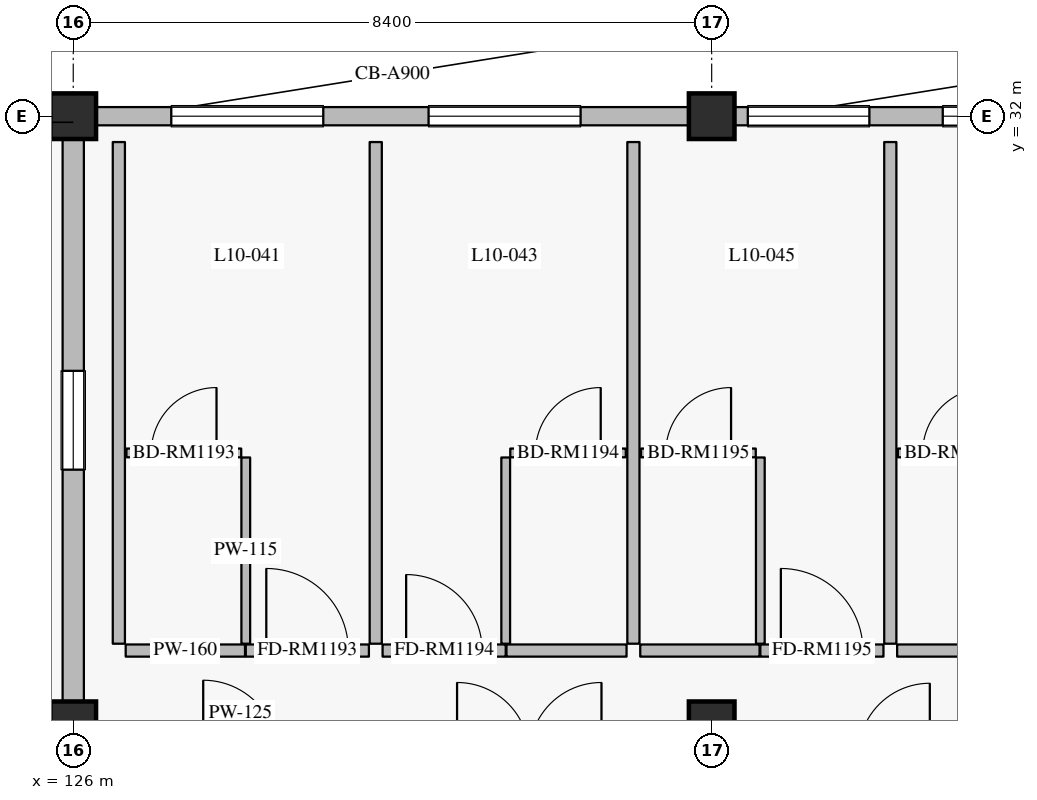
"""IFC4 building model, lengths in metres.
Left out: names, types, materials, properties, quantities, classifications, styles, units other than length and angle.
Written with IfcOpenShell. Run it as: python <this file> out.ifc"""

import sys

from ifc_helpers import new_model, si_unit, direction, frame, frame_2d, origin, origin_2d, place, context, subcontext, project, spatial, rectangle, extrude, element, fill, save


model = new_model("IFC4")
c1 = context("Model", 3, precision=1e-05, world=origin(), true_north=direction((0.0, 1.0)))
c2 = subcontext(c1, "Body", "Model", "MODEL_VIEW")
j1 = project(units=[si_unit("LENGTHUNIT", "METRE"), si_unit("PLANEANGLEUNIT", "RADIAN")], contexts=[c1])
p1 = place(None, origin())
s1 = spatial("IfcSite", under=j1, at=p1, CompositionType="ELEMENT")
p2 = place(p1, origin())
s2 = spatial("IfcBuilding", under=s1, at=p2, CompositionType="ELEMENT")
p3 = place(p2, frame((0.0, 0.0, 43.2)))
s3 = spatial("IfcBuildingStorey", under=s2, at=p3, CompositionType="ELEMENT", Elevation=43.2)
for number, where, z_axis, x_axis in (
    (1, (126.0, 32.0, 0.0), (0.0, 0.0, 1.0), (1.0, 0.0, 0.0)),
    (2, (134.4, 32.0, 0.0), (0.0, 0.0, 1.0), (1.0, 0.0, 0.0)),
    (3, (126.0, 24.0, 0.0), (0.0, 0.0, 1.0), (1.0, 0.0, 0.0)),
    (4, (134.4, 24.0, 0.0), (0.0, 0.0, 1.0), (1.0, 0.0, 0.0)),
):
    element("IfcColumn", number, at=place(p3, frame(where, z_axis=z_axis, x_axis=x_axis)), inside=s3, PredefinedType="COLUMN", context=c2, shape_type="SweptSolid", body=[
        extrude(rectangle(XDim=0.6, YDim=0.6, at=origin_2d()), origin(), (0.0, 0.0, 1.0), 4.2),
    ])
p4 = place(p3, frame((126.3, 32.0, 0.0), z_axis=(0.0, 0.0, 1.0), x_axis=(1.0, 0.0, 0.0)))
e5 = element("IfcWall", 5, at=p4, inside=s3, PredefinedType="SOLIDWALL", context=c2, shape_type="SweptSolid", body=[
    extrude(rectangle(XDim=7.8, YDim=0.24, at=frame_2d((3.9, 0.0))), origin(), (0.0, 0.0, 1.0), 3.54),
])
p5 = place(p4, frame((0.99, 0.0, 0.8)))
e6 = element("IfcOpeningElement", 6, at=p5, cuts=e5, PredefinedType="OPENING", context=c2, shape_type="SweptSolid", body=[
    extrude(rectangle(XDim=2.0, YDim=1.75, at=frame_2d((1.0, 0.875))), frame((0.0, 0.13, 0.0), z_axis=(0.0, -1.0, 0.0), x_axis=(1.0, 0.0, 0.0)), (0.0, 0.0, 1.0), 0.26),
])
p6 = place(p4, frame((4.375, 0.0, 0.8)))
e7 = element("IfcOpeningElement", 7, at=p6, cuts=e5, PredefinedType="OPENING", context=c2, shape_type="SweptSolid", body=[
    extrude(rectangle(XDim=2.0, YDim=1.75, at=frame_2d((1.0, 0.875))), frame((0.0, 0.13, 0.0), z_axis=(0.0, -1.0, 0.0), x_axis=(1.0, 0.0, 0.0)), (0.0, 0.0, 1.0), 0.26),
])
p7 = place(p3, frame((134.7, 32.0, 0.0), z_axis=(0.0, 0.0, 1.0), x_axis=(1.0, 0.0, 0.0)))
e8 = element("IfcWall", 8, at=p7, inside=s3, PredefinedType="SOLIDWALL", context=c2, shape_type="SweptSolid", body=[
    extrude(rectangle(XDim=7.8, YDim=0.24, at=frame_2d((3.9, 0.0))), origin(), (0.0, 0.0, 1.0), 3.54),
])
p8 = place(p7, frame((0.175, 0.0, 0.8)))
e9 = element("IfcOpeningElement", 9, at=p8, cuts=e8, PredefinedType="OPENING", context=c2, shape_type="SweptSolid", body=[
    extrude(rectangle(XDim=1.6, YDim=1.6, at=frame_2d((0.8, 0.8))), frame((0.0, 0.13, 0.0), z_axis=(0.0, -1.0, 0.0), x_axis=(1.0, 0.0, 0.0)), (0.0, 0.0, 1.0), 0.26),
])
p9 = place(p7, frame((2.74, 0.0, 0.8)))
e10 = element("IfcOpeningElement", 10, at=p9, cuts=e8, PredefinedType="OPENING", context=c2, shape_type="SweptSolid", body=[
    extrude(rectangle(XDim=2.0, YDim=1.75, at=frame_2d((1.0, 0.875))), frame((0.0, 0.13, 0.0), z_axis=(0.0, -1.0, 0.0), x_axis=(1.0, 0.0, 0.0)), (0.0, 0.0, 1.0), 0.26),
])
p10 = place(p7, frame((5.665, 0.0, 0.8)))
e11 = element("IfcOpeningElement", 11, at=p10, cuts=e8, PredefinedType="OPENING", context=c2, shape_type="SweptSolid", body=[
    extrude(rectangle(XDim=2.0, YDim=1.75, at=frame_2d((1.0, 0.875))), frame((0.0, 0.13, 0.0), z_axis=(0.0, -1.0, 0.0), x_axis=(1.0, 0.0, 0.0)), (0.0, 0.0, 1.0), 0.26),
])
p11 = place(p3, frame((126.0, 24.3, 0.0), z_axis=(0.0, 0.0, 1.0), x_axis=(0.0, 1.0, 0.0)))
e12 = element("IfcWall", 12, at=p11, inside=s3, PredefinedType="SOLIDWALL", context=c2, shape_type="SweptSolid", body=[
    extrude(rectangle(XDim=7.4, YDim=0.28, at=frame_2d((3.7, 0.0))), origin(), (0.0, 0.0, 1.0), 3.3),
])
p12 = place(p11, frame((3.05, 0.0, 0.75)))
e13 = element("IfcOpeningElement", 13, at=p12, cuts=e12, PredefinedType="OPENING", context=c2, shape_type="SweptSolid", body=[
    extrude(rectangle(XDim=1.3, YDim=1.65, at=frame_2d((0.65, 0.825))), frame((0.0, 0.15, 0.0), z_axis=(0.0, -1.0, 0.0), x_axis=(1.0, 0.0, 0.0)), (0.0, 0.0, 1.0), 0.3),
])
p13 = place(p3, frame((126.69, 24.97, 0.0), z_axis=(0.0, 0.0, 1.0), x_axis=(1.0, 0.0, 0.0)))
e14 = element("IfcWall", 14, at=p13, inside=s3, PredefinedType="PARTITIONING", context=c2, shape_type="SweptSolid", body=[
    extrude(rectangle(XDim=1.57, YDim=0.16, at=frame_2d((0.785, 0.0))), origin(), (0.0, 0.0, 1.0), 3.935),
])
p14 = place(p3, frame((128.27, 24.97, 0.0), z_axis=(0.0, 0.0, 1.0), x_axis=(1.0, 0.0, 0.0)))
e15 = element("IfcWall", 15, at=p14, inside=s3, PredefinedType="PARTITIONING", context=c2, shape_type="SweptSolid", body=[
    extrude(rectangle(XDim=1.62, YDim=0.16, at=frame_2d((0.81, 0.0))), origin(), (0.0, 0.0, 1.0), 3.935),
])
p15 = place(p14, frame((0.27, 0.0, 0.0)))
e16 = element("IfcOpeningElement", 16, at=p15, cuts=e15, PredefinedType="OPENING", context=c2, shape_type="SweptSolid", body=[
    extrude(rectangle(XDim=1.08, YDim=2.3, at=frame_2d((0.54, 1.15))), frame((0.0, 0.09, 0.0), z_axis=(0.0, -1.0, 0.0), x_axis=(1.0, 0.0, 0.0)), (0.0, 0.0, 1.0), 0.18),
])
p16 = place(p3, frame((128.27, 25.06, 0.0), z_axis=(0.0, 0.0, 1.0), x_axis=(0.0, 1.0, 0.0)))
e17 = element("IfcWall", 17, at=p16, inside=s3, PredefinedType="PARTITIONING", context=c2, shape_type="SweptSolid", body=[
    extrude(rectangle(XDim=2.45, YDim=0.115, at=frame_2d((1.225, 0.0))), origin(), (0.0, 0.0, 1.0), 3.935),
])
p17 = place(p3, frame((126.7, 27.57, 0.0), z_axis=(0.0, 0.0, 1.0), x_axis=(1.0, 0.0, 0.0)))
e18 = element("IfcWall", 18, at=p17, inside=s3, PredefinedType="PARTITIONING", context=c2, shape_type="SweptSolid", body=[
    extrude(rectangle(XDim=1.51, YDim=0.115, at=frame_2d((0.755, 0.0))), origin(), (0.0, 0.0, 1.0), 3.935),
])
p18 = place(p17, frame((0.325, 0.0, 0.0)))
e19 = element("IfcOpeningElement", 19, at=p18, cuts=e18, PredefinedType="OPENING", context=c2, shape_type="SweptSolid", body=[
    extrude(rectangle(XDim=0.86, YDim=2.12, at=frame_2d((0.43, 1.06))), frame((0.0, 0.067, 0.0), z_axis=(0.0, -1.0, 0.0), x_axis=(1.0, 0.0, 0.0)), (0.0, 0.0, 1.0), 0.135),
])
p19 = place(p3, frame((126.6, 25.06, 0.0), z_axis=(0.0, 0.0, 1.0), x_axis=(0.0, 1.0, 0.0)))
e20 = element("IfcWall", 20, at=p19, inside=s3, PredefinedType="PARTITIONING", context=c2, shape_type="SweptSolid", body=[
    extrude(rectangle(XDim=6.6, YDim=0.16, at=frame_2d((3.3, 0.0))), origin(), (0.0, 0.0, 1.0), 3.935),
])
p20 = place(p3, frame((130.07, 24.97, 0.0), z_axis=(0.0, 0.0, 1.0), x_axis=(1.0, 0.0, 0.0)))
e21 = element("IfcWall", 21, at=p20, inside=s3, PredefinedType="PARTITIONING", context=c2, shape_type="SweptSolid", body=[
    extrude(rectangle(XDim=1.62, YDim=0.16, at=frame_2d((0.81, 0.0))), origin(), (0.0, 0.0, 1.0), 3.935),
])
p21 = place(p20, frame((0.31, 0.0, 0.0)))
e22 = element("IfcOpeningElement", 22, at=p21, cuts=e21, PredefinedType="OPENING", context=c2, shape_type="SweptSolid", body=[
    extrude(rectangle(XDim=1.0, YDim=2.25, at=frame_2d((0.5, 1.125))), frame((0.0, 0.09, 0.0), z_axis=(0.0, -1.0, 0.0), x_axis=(1.0, 0.0, 0.0)), (0.0, 0.0, 1.0), 0.18),
])
p22 = place(p3, frame((131.7, 24.97, 0.0), z_axis=(0.0, 0.0, 1.0), x_axis=(1.0, 0.0, 0.0)))
e23 = element("IfcWall", 23, at=p22, inside=s3, PredefinedType="PARTITIONING", context=c2, shape_type="SweptSolid", body=[
    extrude(rectangle(XDim=1.58, YDim=0.16, at=frame_2d((0.79, 0.0))), origin(), (0.0, 0.0, 1.0), 3.935),
])
p23 = place(p3, frame((131.69, 25.06, 0.0), z_axis=(0.0, 0.0, 1.0), x_axis=(0.0, 1.0, 0.0)))
e24 = element("IfcWall", 24, at=p23, inside=s3, PredefinedType="PARTITIONING", context=c2, shape_type="SweptSolid", body=[
    extrude(rectangle(XDim=2.45, YDim=0.115, at=frame_2d((1.225, 0.0))), origin(), (0.0, 0.0, 1.0), 3.935),
])
p24 = place(p3, frame((131.75, 27.57, 0.0), z_axis=(0.0, 0.0, 1.0), x_axis=(1.0, 0.0, 0.0)))
e25 = element("IfcWall", 25, at=p24, inside=s3, PredefinedType="PARTITIONING", context=c2, shape_type="SweptSolid", body=[
    extrude(rectangle(XDim=1.52, YDim=0.115, at=frame_2d((0.76, 0.0))), origin(), (0.0, 0.0, 1.0), 3.935),
])
p25 = place(p24, frame((0.33, 0.0, 0.0)))
e26 = element("IfcOpeningElement", 26, at=p25, cuts=e25, PredefinedType="OPENING", context=c2, shape_type="SweptSolid", body=[
    extrude(rectangle(XDim=0.86, YDim=2.12, at=frame_2d((0.43, 1.06))), frame((0.0, 0.067, 0.0), z_axis=(0.0, -1.0, 0.0), x_axis=(1.0, 0.0, 0.0)), (0.0, 0.0, 1.0), 0.135),
])
p26 = place(p3, frame((129.98, 25.06, 0.0), z_axis=(0.0, 0.0, 1.0), x_axis=(0.0, 1.0, 0.0)))
e27 = element("IfcWall", 27, at=p26, inside=s3, PredefinedType="PARTITIONING", context=c2, shape_type="SweptSolid", body=[
    extrude(rectangle(XDim=6.6, YDim=0.16, at=frame_2d((3.3, 0.0))), origin(), (0.0, 0.0, 1.0), 3.935),
])
p27 = place(p3, frame((133.46, 24.97, 0.0), z_axis=(0.0, 0.0, 1.0), x_axis=(1.0, 0.0, 0.0)))
e28 = element("IfcWall", 28, at=p27, inside=s3, PredefinedType="PARTITIONING", context=c2, shape_type="SweptSolid", body=[
    extrude(rectangle(XDim=1.57, YDim=0.16, at=frame_2d((0.785, 0.0))), origin(), (0.0, 0.0, 1.0), 3.935),
])
p28 = place(p3, frame((135.04, 24.97, 0.0), z_axis=(0.0, 0.0, 1.0), x_axis=(1.0, 0.0, 0.0)))
e29 = element("IfcWall", 29, at=p28, inside=s3, PredefinedType="PARTITIONING", context=c2, shape_type="SweptSolid", body=[
    extrude(rectangle(XDim=1.62, YDim=0.16, at=frame_2d((0.81, 0.0))), origin(), (0.0, 0.0, 1.0), 3.935),
])
p29 = place(p28, frame((0.27, 0.0, 0.0)))
e30 = element("IfcOpeningElement", 30, at=p29, cuts=e29, PredefinedType="OPENING", context=c2, shape_type="SweptSolid", body=[
    extrude(rectangle(XDim=1.08, YDim=2.3, at=frame_2d((0.54, 1.15))), frame((0.0, 0.09, 0.0), z_axis=(0.0, -1.0, 0.0), x_axis=(1.0, 0.0, 0.0)), (0.0, 0.0, 1.0), 0.18),
])
p30 = place(p3, frame((135.04, 25.06, 0.0), z_axis=(0.0, 0.0, 1.0), x_axis=(0.0, 1.0, 0.0)))
e31 = element("IfcWall", 31, at=p30, inside=s3, PredefinedType="PARTITIONING", context=c2, shape_type="SweptSolid", body=[
    extrude(rectangle(XDim=2.45, YDim=0.115, at=frame_2d((1.225, 0.0))), origin(), (0.0, 0.0, 1.0), 3.935),
])
p31 = place(p3, frame((133.47, 27.57, 0.0), z_axis=(0.0, 0.0, 1.0), x_axis=(1.0, 0.0, 0.0)))
e32 = element("IfcWall", 32, at=p31, inside=s3, PredefinedType="PARTITIONING", context=c2, shape_type="SweptSolid", body=[
    extrude(rectangle(XDim=1.51, YDim=0.115, at=frame_2d((0.755, 0.0))), origin(), (0.0, 0.0, 1.0), 3.935),
])
p32 = place(p31, frame((0.325, 0.0, 0.0)))
e33 = element("IfcOpeningElement", 33, at=p32, cuts=e32, PredefinedType="OPENING", context=c2, shape_type="SweptSolid", body=[
    extrude(rectangle(XDim=0.86, YDim=2.12, at=frame_2d((0.43, 1.06))), frame((0.0, 0.067, 0.0), z_axis=(0.0, -1.0, 0.0), x_axis=(1.0, 0.0, 0.0)), (0.0, 0.0, 1.0), 0.135),
])
p33 = place(p3, frame((133.37, 25.06, 0.0), z_axis=(0.0, 0.0, 1.0), x_axis=(0.0, 1.0, 0.0)))
e34 = element("IfcWall", 34, at=p33, inside=s3, PredefinedType="PARTITIONING", context=c2, shape_type="SweptSolid", body=[
    extrude(rectangle(XDim=6.6, YDim=0.16, at=frame_2d((3.3, 0.0))), origin(), (0.0, 0.0, 1.0), 3.935),
])
p34 = place(p3, frame((136.84, 24.97, 0.0), z_axis=(0.0, 0.0, 1.0), x_axis=(1.0, 0.0, 0.0)))
e35 = element("IfcWall", 35, at=p34, inside=s3, PredefinedType="PARTITIONING", context=c2, shape_type="SweptSolid", body=[
    extrude(rectangle(XDim=1.57, YDim=0.16, at=frame_2d((0.785, 0.0))), origin(), (0.0, 0.0, 1.0), 3.935),
])
p35 = place(p3, frame((136.85, 27.57, 0.0), z_axis=(0.0, 0.0, 1.0), x_axis=(1.0, 0.0, 0.0)))
e36 = element("IfcWall", 36, at=p35, inside=s3, PredefinedType="PARTITIONING", context=c2, shape_type="SweptSolid", body=[
    extrude(rectangle(XDim=1.51, YDim=0.115, at=frame_2d((0.755, 0.0))), origin(), (0.0, 0.0, 1.0), 3.935),
])
p36 = place(p35, frame((0.325, 0.0, 0.0)))
e37 = element("IfcOpeningElement", 37, at=p36, cuts=e36, PredefinedType="OPENING", context=c2, shape_type="SweptSolid", body=[
    extrude(rectangle(XDim=0.86, YDim=2.12, at=frame_2d((0.43, 1.06))), frame((0.0, 0.067, 0.0), z_axis=(0.0, -1.0, 0.0), x_axis=(1.0, 0.0, 0.0)), (0.0, 0.0, 1.0), 0.135),
])
p37 = place(p3, frame((136.75, 25.06, 0.0), z_axis=(0.0, 0.0, 1.0), x_axis=(0.0, 1.0, 0.0)))
e38 = element("IfcWall", 38, at=p37, inside=s3, PredefinedType="PARTITIONING", context=c2, shape_type="SweptSolid", body=[
    extrude(rectangle(XDim=6.6, YDim=0.16, at=frame_2d((3.3, 0.0))), origin(), (0.0, 0.0, 1.0), 3.935),
])
p38 = place(p5, origin())
e39 = element("IfcWindow", 39, at=p38, inside=s3, PartitioningType="DOUBLE_PANEL_VERTICAL", PredefinedType="WINDOW", context=c2, shape_type="SweptSolid", body=[
    extrude(rectangle(XDim=2.0, YDim=1.75, at=frame_2d((1.0, 0.875))), frame((0.0, 0.03, 0.0), z_axis=(0.0, -1.0, 0.0), x_axis=(1.0, 0.0, 0.0)), (0.0, 0.0, 1.0), 0.06),
])
fill(e6, e39)
p39 = place(p6, origin())
e40 = element("IfcWindow", 40, at=p39, inside=s3, PartitioningType="DOUBLE_PANEL_VERTICAL", PredefinedType="WINDOW", context=c2, shape_type="SweptSolid", body=[
    extrude(rectangle(XDim=2.0, YDim=1.75, at=frame_2d((1.0, 0.875))), frame((0.0, 0.03, 0.0), z_axis=(0.0, -1.0, 0.0), x_axis=(1.0, 0.0, 0.0)), (0.0, 0.0, 1.0), 0.06),
])
fill(e7, e40)
p40 = place(p8, origin())
e41 = element("IfcWindow", 41, at=p40, inside=s3, PartitioningType="SINGLE_PANEL", PredefinedType="WINDOW", context=c2, shape_type="SweptSolid", body=[
    extrude(rectangle(XDim=1.6, YDim=1.6, at=frame_2d((0.8, 0.8))), frame((0.0, 0.03, 0.0), z_axis=(0.0, -1.0, 0.0), x_axis=(1.0, 0.0, 0.0)), (0.0, 0.0, 1.0), 0.06),
])
fill(e9, e41)
p41 = place(p9, origin())
e42 = element("IfcWindow", 42, at=p41, inside=s3, PartitioningType="DOUBLE_PANEL_VERTICAL", PredefinedType="WINDOW", context=c2, shape_type="SweptSolid", body=[
    extrude(rectangle(XDim=2.0, YDim=1.75, at=frame_2d((1.0, 0.875))), frame((0.0, 0.03, 0.0), z_axis=(0.0, -1.0, 0.0), x_axis=(1.0, 0.0, 0.0)), (0.0, 0.0, 1.0), 0.06),
])
fill(e10, e42)
p42 = place(p12, origin())
e43 = element("IfcWindow", 43, at=p42, inside=s3, PartitioningType="SINGLE_PANEL", PredefinedType="WINDOW", context=c2, shape_type="SweptSolid", body=[
    extrude(rectangle(XDim=1.3, YDim=1.65, at=frame_2d((0.65, 0.825))), frame((0.0, 0.03, 0.0), z_axis=(0.0, -1.0, 0.0), x_axis=(1.0, 0.0, 0.0)), (0.0, 0.0, 1.0), 0.06),
])
fill(e13, e43)
p43 = place(p15, origin())
e44 = element("IfcDoor", 44, at=p43, inside=s3, OperationType="SINGLE_SWING_LEFT", PredefinedType="DOOR", context=c2, shape_type="SweptSolid", body=[
    extrude(rectangle(XDim=1.08, YDim=2.3, at=frame_2d((0.54, 1.15))), frame((0.0, 0.025, 0.0), z_axis=(0.0, -1.0, 0.0), x_axis=(1.0, 0.0, 0.0)), (0.0, 0.0, 1.0), 0.05),
])
fill(e16, e44)
p44 = place(p18, origin())
e45 = element("IfcDoor", 45, at=p44, inside=s3, OperationType="SINGLE_SWING_RIGHT", PredefinedType="DOOR", context=c2, shape_type="SweptSolid", body=[
    extrude(rectangle(XDim=0.86, YDim=2.12, at=frame_2d((0.43, 1.06))), frame((0.0, 0.025, 0.0), z_axis=(0.0, -1.0, 0.0), x_axis=(1.0, 0.0, 0.0)), (0.0, 0.0, 1.0), 0.05),
])
fill(e19, e45)
p45 = place(p21, origin())
e46 = element("IfcDoor", 46, at=p45, inside=s3, OperationType="SINGLE_SWING_LEFT", PredefinedType="DOOR", context=c2, shape_type="SweptSolid", body=[
    extrude(rectangle(XDim=1.0, YDim=2.25, at=frame_2d((0.5, 1.125))), frame((0.0, 0.025, 0.0), z_axis=(0.0, -1.0, 0.0), x_axis=(1.0, 0.0, 0.0)), (0.0, 0.0, 1.0), 0.05),
])
fill(e22, e46)
p46 = place(p25, origin())
e47 = element("IfcDoor", 47, at=p46, inside=s3, OperationType="SINGLE_SWING_RIGHT", PredefinedType="DOOR", context=c2, shape_type="SweptSolid", body=[
    extrude(rectangle(XDim=0.86, YDim=2.12, at=frame_2d((0.43, 1.06))), frame((0.0, 0.025, 0.0), z_axis=(0.0, -1.0, 0.0), x_axis=(1.0, 0.0, 0.0)), (0.0, 0.0, 1.0), 0.05),
])
fill(e26, e47)
p47 = place(p29, origin())
e48 = element("IfcDoor", 48, at=p47, inside=s3, OperationType="SINGLE_SWING_LEFT", PredefinedType="DOOR", context=c2, shape_type="SweptSolid", body=[
    extrude(rectangle(XDim=1.08, YDim=2.3, at=frame_2d((0.54, 1.15))), frame((0.0, 0.025, 0.0), z_axis=(0.0, -1.0, 0.0), x_axis=(1.0, 0.0, 0.0)), (0.0, 0.0, 1.0), 0.05),
])
fill(e30, e48)
p48 = place(p32, origin())
e49 = element("IfcDoor", 49, at=p48, inside=s3, OperationType="SINGLE_SWING_RIGHT", PredefinedType="DOOR", context=c2, shape_type="SweptSolid", body=[
    extrude(rectangle(XDim=0.86, YDim=2.12, at=frame_2d((0.43, 1.06))), frame((0.0, 0.025, 0.0), z_axis=(0.0, -1.0, 0.0), x_axis=(1.0, 0.0, 0.0)), (0.0, 0.0, 1.0), 0.05),
])
fill(e33, e49)
p49 = place(p36, origin())
e50 = element("IfcDoor", 50, at=p49, inside=s3, OperationType="SINGLE_SWING_RIGHT", PredefinedType="DOOR", context=c2, shape_type="SweptSolid", body=[
    extrude(rectangle(XDim=0.86, YDim=2.12, at=frame_2d((0.43, 1.06))), frame((0.0, 0.025, 0.0), z_axis=(0.0, -1.0, 0.0), x_axis=(1.0, 0.0, 0.0)), (0.0, 0.0, 1.0), 0.05),
])
fill(e37, e50)
save(model, sys.argv[1])
